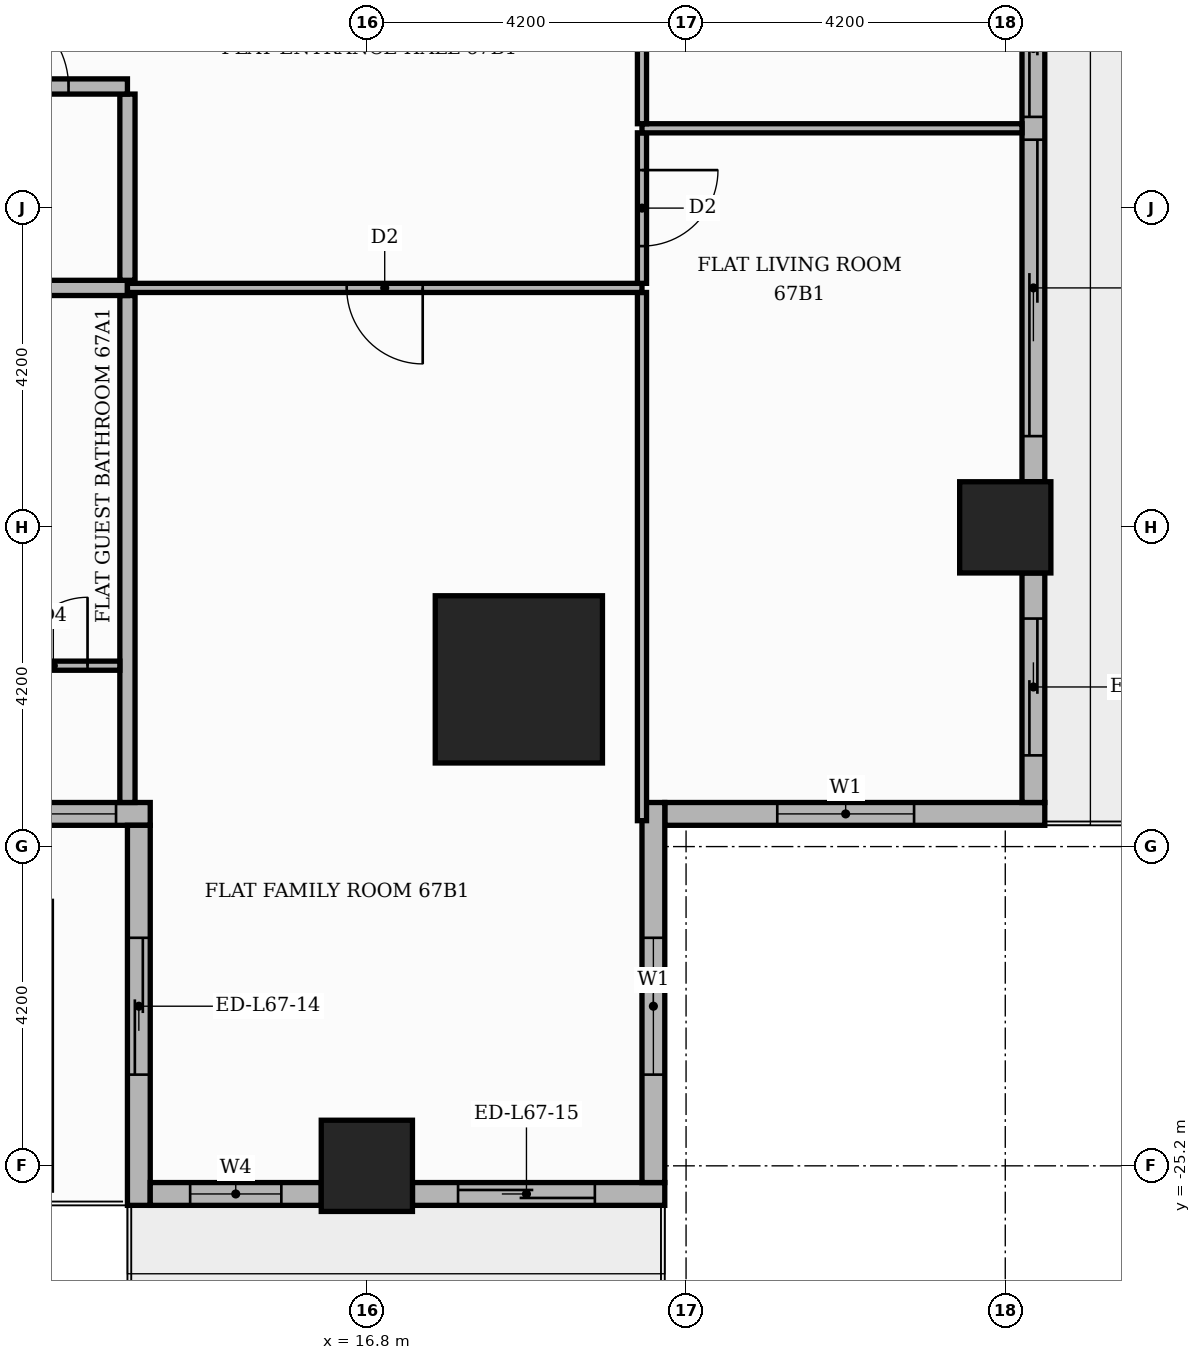
"""IFC4 building model, lengths in metres.
Left out: names, types, materials, properties, quantities, classifications, styles, units other than length and angle.
Written with IfcOpenShell. Run it as: python <this file> out.ifc"""

import sys

from ifc_helpers import new_model, si_unit, direction, frame, frame_2d, origin, origin_2d, place, context, subcontext, project, spatial, rectangle, extrude, element, fill, save


model = new_model("IFC4")
c1 = context("Model", 3, precision=1e-05, world=origin(), true_north=direction((0.0, 1.0)))
c2 = subcontext(c1, "Body", "Model", "MODEL_VIEW")
j1 = project(units=[si_unit("LENGTHUNIT", "METRE"), si_unit("PLANEANGLEUNIT", "RADIAN")], contexts=[c1])
p1 = place(None, origin())
s1 = spatial("IfcSite", under=j1, at=p1, CompositionType="ELEMENT")
p2 = place(p1, origin())
s2 = spatial("IfcBuilding", under=s1, at=p2, CompositionType="ELEMENT")
p3 = place(p2, frame((0.0, 0.0, 279.6)))
s3 = spatial("IfcBuildingStorey", under=s2, at=p3, CompositionType="ELEMENT", Elevation=279.6)
p4 = place(p3, frame((18.8, -18.8, 0.0), z_axis=(0.0, 0.0, 1.0), x_axis=(1.0, 0.0, 0.0)))
e1 = element("IfcColumn", 1, at=p4, inside=s3, PredefinedType="COLUMN", context=c2, shape_type="SweptSolid", body=[
    extrude(rectangle(XDim=2.2, YDim=2.2, at=origin_2d()), origin(), (0.0, 0.0, 1.0), 3.9),
])
for number, where, z_axis, x_axis in (
    (2, (25.2, -16.8, 0.0), (0.0, 0.0, 1.0), (1.0, 0.0, 0.0)),
    (3, (16.8, -25.2, 0.0), (0.0, 0.0, 1.0), (1.0, 0.0, 0.0)),
):
    element("IfcColumn", number, at=place(p3, frame(where, z_axis=z_axis, x_axis=x_axis)), inside=s3, PredefinedType="COLUMN", context=c2, shape_type="SweptSolid", body=[
        extrude(rectangle(XDim=1.2, YDim=1.2, at=origin_2d()), origin(), (0.0, 0.0, 1.0), 3.9),
    ])
p5 = place(p3, frame((20.72, -20.57, 0.0), z_axis=(0.0, 0.0, 1.0), x_axis=(1.0, 0.0, 0.0)))
e4 = element("IfcWall", 4, at=p5, inside=s3, PredefinedType="STANDARD", context=c2, shape_type="SweptSolid", body=[
    extrude(rectangle(XDim=5.0, YDim=0.3, at=frame_2d((2.5, 0.0))), origin(), (0.0, 0.0, 1.0), 3.48),
])
p6 = place(p5, frame((1.48, 0.0, 0.9)))
e5 = element("IfcOpeningElement", 5, at=p6, cuts=e4, PredefinedType="OPENING", context=c2, shape_type="SweptSolid", body=[
    extrude(rectangle(XDim=1.8, YDim=2.1, at=frame_2d((0.9, 1.05))), frame((0.0, 0.16, 0.0), z_axis=(0.0, -1.0, 0.0), x_axis=(1.0, 0.0, 0.0)), (0.0, 0.0, 1.0), 0.32),
])
p7 = place(p3, frame((25.57, -20.42, 0.0), z_axis=(0.0, 0.0, 1.0), x_axis=(0.0, 1.0, 0.0)))
e6 = element("IfcWall", 6, at=p7, inside=s3, PredefinedType="STANDARD", context=c2, shape_type="SweptSolid", body=[
    extrude(rectangle(XDim=3.02, YDim=0.3, at=frame_2d((1.51, 0.0))), origin(), (0.0, 0.0, 1.0), 3.48),
])
p8 = place(p7, frame((0.62, 0.0, 0.0)))
e7 = element("IfcOpeningElement", 7, at=p8, cuts=e6, PredefinedType="OPENING", context=c2, shape_type="SweptSolid", body=[
    extrude(rectangle(XDim=1.8, YDim=2.4, at=frame_2d((0.9, 1.2))), frame((0.0, 0.16, 0.0), z_axis=(0.0, -1.0, 0.0), x_axis=(1.0, 0.0, 0.0)), (0.0, 0.0, 1.0), 0.32),
])
p9 = place(p3, frame((25.57, -16.2, 0.0), z_axis=(0.0, 0.0, 1.0), x_axis=(0.0, 1.0, 0.0)))
e8 = element("IfcWall", 8, at=p9, inside=s3, PredefinedType="STANDARD", context=c2, shape_type="SweptSolid", body=[
    extrude(rectangle(XDim=7.2, YDim=0.3, at=frame_2d((3.6, 0.0))), origin(), (0.0, 0.0, 1.0), 3.48),
])
p10 = place(p9, frame((0.6, 0.0, 0.0)))
e9 = element("IfcOpeningElement", 9, at=p10, cuts=e8, PredefinedType="OPENING", context=c2, shape_type="SweptSolid", body=[
    extrude(rectangle(XDim=3.9, YDim=2.4, at=frame_2d((1.95, 1.2))), frame((0.0, 0.16, 0.0), z_axis=(0.0, -1.0, 0.0), x_axis=(1.0, 0.0, 0.0)), (0.0, 0.0, 1.0), 0.32),
])
p11 = place(p9, frame((4.8, 0.0, 0.0)))
e10 = element("IfcOpeningElement", 10, at=p11, cuts=e8, PredefinedType="OPENING", context=c2, shape_type="SweptSolid", body=[
    extrude(rectangle(XDim=1.8, YDim=2.4, at=frame_2d((0.9, 1.2))), frame((0.0, 0.16, 0.0), z_axis=(0.0, -1.0, 0.0), x_axis=(1.0, 0.0, 0.0)), (0.0, 0.0, 1.0), 0.32),
])
p12 = place(p3, frame((-13.65, -20.57, 0.0), z_axis=(0.0, 0.0, 1.0), x_axis=(1.0, 0.0, 0.0)))
e11 = element("IfcWall", 11, at=p12, inside=s3, PredefinedType="STANDARD", context=c2, shape_type="SweptSolid", body=[
    extrude(rectangle(XDim=27.6, YDim=0.3, at=frame_2d((13.8, 0.0))), origin(), (0.0, 0.0, 1.0), 3.48),
])
p13 = place(p12, frame((0.15, 0.0, 0.9)))
e12 = element("IfcOpeningElement", 12, at=p13, cuts=e11, PredefinedType="OPENING", context=c2, shape_type="SweptSolid", body=[
    extrude(rectangle(XDim=1.8, YDim=2.1, at=frame_2d((0.9, 1.05))), frame((0.0, 0.16, 0.0), z_axis=(0.0, -1.0, 0.0), x_axis=(1.0, 0.0, 0.0)), (0.0, 0.0, 1.0), 0.32),
])
p14 = place(p12, frame((2.25, 0.0, 0.9)))
e13 = element("IfcOpeningElement", 13, at=p14, cuts=e11, PredefinedType="OPENING", context=c2, shape_type="SweptSolid", body=[
    extrude(rectangle(XDim=6.0, YDim=2.1, at=frame_2d((3.0, 1.05))), frame((0.0, 0.16, 0.0), z_axis=(0.0, -1.0, 0.0), x_axis=(1.0, 0.0, 0.0)), (0.0, 0.0, 1.0), 0.32),
])
p15 = place(p12, frame((8.55, 0.0, 0.9)))
e14 = element("IfcOpeningElement", 14, at=p15, cuts=e11, PredefinedType="OPENING", context=c2, shape_type="SweptSolid", body=[
    extrude(rectangle(XDim=6.0, YDim=2.1, at=frame_2d((3.0, 1.05))), frame((0.0, 0.16, 0.0), z_axis=(0.0, -1.0, 0.0), x_axis=(1.0, 0.0, 0.0)), (0.0, 0.0, 1.0), 0.32),
])
p16 = place(p12, frame((14.85, 0.0, 0.9)))
e15 = element("IfcOpeningElement", 15, at=p16, cuts=e11, PredefinedType="OPENING", context=c2, shape_type="SweptSolid", body=[
    extrude(rectangle(XDim=6.0, YDim=2.1, at=frame_2d((3.0, 1.05))), frame((0.0, 0.16, 0.0), z_axis=(0.0, -1.0, 0.0), x_axis=(1.0, 0.0, 0.0)), (0.0, 0.0, 1.0), 0.32),
])
p17 = place(p12, frame((21.15, 0.0, 0.9)))
e16 = element("IfcOpeningElement", 16, at=p17, cuts=e11, PredefinedType="OPENING", context=c2, shape_type="SweptSolid", body=[
    extrude(rectangle(XDim=6.0, YDim=2.1, at=frame_2d((3.0, 1.05))), frame((0.0, 0.16, 0.0), z_axis=(0.0, -1.0, 0.0), x_axis=(1.0, 0.0, 0.0)), (0.0, 0.0, 1.0), 0.32),
])
p18 = place(p3, frame((13.8, -20.72, 0.0), z_axis=(0.0, 0.0, 1.0), x_axis=(0.0, -1.0, 0.0)))
e17 = element("IfcWall", 17, at=p18, inside=s3, PredefinedType="STANDARD", context=c2, shape_type="SweptSolid", body=[
    extrude(rectangle(XDim=5.0, YDim=0.3, at=frame_2d((2.5, 0.0))), origin(), (0.0, 0.0, 1.0), 3.48),
])
p19 = place(p18, frame((1.48, 0.0, 0.0)))
e18 = element("IfcOpeningElement", 18, at=p19, cuts=e17, PredefinedType="OPENING", context=c2, shape_type="SweptSolid", body=[
    extrude(rectangle(XDim=1.8, YDim=2.4, at=frame_2d((0.9, 1.2))), frame((0.0, 0.16, 0.0), z_axis=(0.0, -1.0, 0.0), x_axis=(1.0, 0.0, 0.0)), (0.0, 0.0, 1.0), 0.32),
])
p20 = place(p3, frame((13.95, -25.57, 0.0), z_axis=(0.0, 0.0, 1.0), x_axis=(1.0, 0.0, 0.0)))
e19 = element("IfcWall", 19, at=p20, inside=s3, PredefinedType="STANDARD", context=c2, shape_type="SweptSolid", body=[
    extrude(rectangle(XDim=2.25, YDim=0.3, at=frame_2d((1.125, 0.0))), origin(), (0.0, 0.0, 1.0), 3.48),
])
p21 = place(p20, frame((0.525, 0.0, 0.9)))
e20 = element("IfcOpeningElement", 20, at=p21, cuts=e19, PredefinedType="OPENING", context=c2, shape_type="SweptSolid", body=[
    extrude(rectangle(XDim=1.2, YDim=2.1, at=frame_2d((0.6, 1.05))), frame((0.0, 0.16, 0.0), z_axis=(0.0, -1.0, 0.0), x_axis=(1.0, 0.0, 0.0)), (0.0, 0.0, 1.0), 0.32),
])
p22 = place(p3, frame((17.4, -25.57, 0.0), z_axis=(0.0, 0.0, 1.0), x_axis=(1.0, 0.0, 0.0)))
e21 = element("IfcWall", 21, at=p22, inside=s3, PredefinedType="STANDARD", context=c2, shape_type="SweptSolid", body=[
    extrude(rectangle(XDim=3.32, YDim=0.3, at=frame_2d((1.66, 0.0))), origin(), (0.0, 0.0, 1.0), 3.48),
])
p23 = place(p22, frame((0.6, 0.0, 0.0)))
e22 = element("IfcOpeningElement", 22, at=p23, cuts=e21, PredefinedType="OPENING", context=c2, shape_type="SweptSolid", body=[
    extrude(rectangle(XDim=1.8, YDim=2.4, at=frame_2d((0.9, 1.2))), frame((0.0, 0.16, 0.0), z_axis=(0.0, -1.0, 0.0), x_axis=(1.0, 0.0, 0.0)), (0.0, 0.0, 1.0), 0.32),
])
p24 = place(p3, frame((20.57, -25.42, 0.0), z_axis=(0.0, 0.0, 1.0), x_axis=(0.0, 1.0, 0.0)))
e23 = element("IfcWall", 23, at=p24, inside=s3, PredefinedType="STANDARD", context=c2, shape_type="SweptSolid", body=[
    extrude(rectangle(XDim=5.0, YDim=0.3, at=frame_2d((2.5, 0.0))), origin(), (0.0, 0.0, 1.0), 3.48),
])
p25 = place(p24, frame((1.42, 0.0, 0.9)))
e24 = element("IfcOpeningElement", 24, at=p25, cuts=e23, PredefinedType="OPENING", context=c2, shape_type="SweptSolid", body=[
    extrude(rectangle(XDim=1.8, YDim=2.1, at=frame_2d((0.9, 1.05))), frame((0.0, 0.16, 0.0), z_axis=(0.0, -1.0, 0.0), x_axis=(1.0, 0.0, 0.0)), (0.0, 0.0, 1.0), 0.32),
])
p26 = place(p3, frame((13.65, -20.42, 0.0), z_axis=(0.0, 0.0, 1.0), x_axis=(0.0, 1.0, 0.0)))
e25 = element("IfcWall", 25, at=p26, inside=s3, PredefinedType="PARTITIONING", context=c2, shape_type="SweptSolid", body=[
    extrude(rectangle(XDim=6.67, YDim=0.2, at=frame_2d((3.335, 0.0))), origin(), (0.0, 0.0, 1.0), 3.48),
])
p27 = place(p3, frame((20.42, -20.659, 0.0), z_axis=(0.0, 0.0, 1.0), x_axis=(0.0, 1.0, 0.0)))
e26 = element("IfcWall", 26, at=p27, inside=s3, PredefinedType="PARTITIONING", context=c2, shape_type="SweptSolid", body=[
    extrude(rectangle(XDim=6.949, YDim=0.12, at=frame_2d((3.475, 0.0))), origin(), (0.0, 0.0, 1.0), 3.48),
])
p28 = place(p3, frame((-7.35, -18.62, 0.0), z_axis=(0.0, 0.0, 1.0), x_axis=(1.0, 0.0, 0.0)))
e27 = element("IfcWall", 27, at=p28, inside=s3, PredefinedType="PARTITIONING", context=c2, shape_type="SweptSolid", body=[
    extrude(rectangle(XDim=20.9, YDim=0.12, at=frame_2d((10.45, 0.0))), origin(), (0.0, 0.0, 1.0), 3.48),
])
p29 = place(p28, frame((2.7, 0.0, 0.0)))
e28 = element("IfcOpeningElement", 28, at=p29, cuts=e27, PredefinedType="OPENING", context=c2, shape_type="SweptSolid", body=[
    extrude(rectangle(XDim=0.9, YDim=2.1, at=frame_2d((0.45, 1.05))), frame((0.0, 0.07, 0.0), z_axis=(0.0, -1.0, 0.0), x_axis=(1.0, 0.0, 0.0)), (0.0, 0.0, 1.0), 0.14),
])
p30 = place(p28, frame((7.95, 0.0, 0.0)))
e29 = element("IfcOpeningElement", 29, at=p30, cuts=e27, PredefinedType="OPENING", context=c2, shape_type="SweptSolid", body=[
    extrude(rectangle(XDim=0.9, YDim=2.1, at=frame_2d((0.45, 1.05))), frame((0.0, 0.07, 0.0), z_axis=(0.0, -1.0, 0.0), x_axis=(1.0, 0.0, 0.0)), (0.0, 0.0, 1.0), 0.14),
])
p31 = place(p28, frame((13.35, 0.0, 0.0)))
e30 = element("IfcOpeningElement", 30, at=p31, cuts=e27, PredefinedType="OPENING", context=c2, shape_type="SweptSolid", body=[
    extrude(rectangle(XDim=0.9, YDim=2.1, at=frame_2d((0.45, 1.05))), frame((0.0, 0.07, 0.0), z_axis=(0.0, -1.0, 0.0), x_axis=(1.0, 0.0, 0.0)), (0.0, 0.0, 1.0), 0.14),
])
p32 = place(p28, frame((17.625, 0.0, 0.0)))
e31 = element("IfcOpeningElement", 31, at=p32, cuts=e27, PredefinedType="OPENING", context=c2, shape_type="SweptSolid", body=[
    extrude(rectangle(XDim=0.9, YDim=2.1, at=frame_2d((0.45, 1.05))), frame((0.0, 0.07, 0.0), z_axis=(0.0, -1.0, 0.0), x_axis=(1.0, 0.0, 0.0)), (0.0, 0.0, 1.0), 0.14),
])
p33 = place(p28, frame((19.575, 0.0, 0.0)))
e32 = element("IfcOpeningElement", 32, at=p33, cuts=e27, PredefinedType="OPENING", context=c2, shape_type="SweptSolid", body=[
    extrude(rectangle(XDim=0.9, YDim=2.1, at=frame_2d((0.45, 1.05))), frame((0.0, 0.07, 0.0), z_axis=(0.0, -1.0, 0.0), x_axis=(1.0, 0.0, 0.0)), (0.0, 0.0, 1.0), 0.14),
])
p34 = place(p3, frame((-25.42, -13.65, 0.0), z_axis=(0.0, 0.0, 1.0), x_axis=(1.0, 0.0, 0.0)))
e33 = element("IfcWall", 33, at=p34, inside=s3, PredefinedType="PARTITIONING", context=c2, shape_type="SweptSolid", body=[
    extrude(rectangle(XDim=39.07, YDim=0.2, at=frame_2d((19.535, 0.0))), origin(), (0.0, 0.0, 1.0), 3.48),
])
p35 = place(p34, frame((14.37, 0.0, 0.0)))
e34 = element("IfcOpeningElement", 34, at=p35, cuts=e33, PredefinedType="OPENING", context=c2, shape_type="SweptSolid", body=[
    extrude(rectangle(XDim=1.1, YDim=2.4, at=frame_2d((0.55, 1.2))), frame((0.0, 0.11, 0.0), z_axis=(0.0, -1.0, 0.0), x_axis=(1.0, 0.0, 0.0)), (0.0, 0.0, 1.0), 0.22),
])
p36 = place(p3, frame((13.65, -13.65, 0.0), z_axis=(0.0, 0.0, 1.0), x_axis=(1.0, 0.0, 0.0)))
e35 = element("IfcWall", 35, at=p36, inside=s3, PredefinedType="PARTITIONING", context=c2, shape_type="SweptSolid", body=[
    extrude(rectangle(XDim=6.77, YDim=0.12, at=frame_2d((3.385, 0.0))), origin(), (0.0, 0.0, 1.0), 3.48),
])
p37 = place(p36, frame((2.885, 0.0, 0.0)))
e36 = element("IfcOpeningElement", 36, at=p37, cuts=e35, PredefinedType="OPENING", context=c2, shape_type="SweptSolid", body=[
    extrude(rectangle(XDim=1.0, YDim=2.1, at=frame_2d((0.5, 1.05))), frame((0.0, 0.07, 0.0), z_axis=(0.0, -1.0, 0.0), x_axis=(1.0, 0.0, 0.0)), (0.0, 0.0, 1.0), 0.14),
])
p38 = place(p3, frame((20.42, -13.59, 0.0), z_axis=(0.0, 0.0, 1.0), x_axis=(0.0, 1.0, 0.0)))
e37 = element("IfcWall", 37, at=p38, inside=s3, PredefinedType="PARTITIONING", context=c2, shape_type="SweptSolid", body=[
    extrude(rectangle(XDim=1.98, YDim=0.12, at=frame_2d((0.99, 0.0))), origin(), (0.0, 0.0, 1.0), 3.48),
])
p39 = place(p38, frame((0.49, 0.0, 0.0)))
e38 = element("IfcOpeningElement", 38, at=p39, cuts=e37, PredefinedType="OPENING", context=c2, shape_type="SweptSolid", body=[
    extrude(rectangle(XDim=1.0, YDim=2.1, at=frame_2d((0.5, 1.05))), frame((0.0, 0.07, 0.0), z_axis=(0.0, -1.0, 0.0), x_axis=(1.0, 0.0, 0.0)), (0.0, 0.0, 1.0), 0.14),
])
p40 = place(p3, frame((13.65, -13.55, 0.0), z_axis=(0.0, 0.0, 1.0), x_axis=(0.0, 1.0, 0.0)))
e39 = element("IfcWall", 39, at=p40, inside=s3, PredefinedType="PARTITIONING", context=c2, shape_type="SweptSolid", body=[
    extrude(rectangle(XDim=2.45, YDim=0.2, at=frame_2d((1.225, 0.0))), origin(), (0.0, 0.0, 1.0), 3.48),
])
p41 = place(p3, frame((20.42, -11.55, 0.0), z_axis=(0.0, 0.0, 1.0), x_axis=(1.0, 0.0, 0.0)))
e40 = element("IfcWall", 40, at=p41, inside=s3, PredefinedType="PARTITIONING", context=c2, shape_type="SweptSolid", body=[
    extrude(rectangle(XDim=5.0, YDim=0.12, at=frame_2d((2.5, 0.0))), origin(), (0.0, 0.0, 1.0), 3.48),
])
p42 = place(p3, frame((20.42, -11.49, 0.0), z_axis=(0.0, 0.0, 1.0), x_axis=(0.0, 1.0, 0.0)))
e41 = element("IfcWall", 41, at=p42, inside=s3, PredefinedType="PARTITIONING", context=c2, shape_type="SweptSolid", body=[
    extrude(rectangle(XDim=8.28, YDim=0.12, at=frame_2d((4.14, 0.0))), origin(), (0.0, 0.0, 1.0), 3.48),
])
p43 = place(p42, frame((3.69, 0.0, 0.0)))
e42 = element("IfcOpeningElement", 42, at=p43, cuts=e41, PredefinedType="OPENING", context=c2, shape_type="SweptSolid", body=[
    extrude(rectangle(XDim=0.9, YDim=2.1, at=frame_2d((0.45, 1.05))), frame((0.0, 0.07, 0.0), z_axis=(0.0, -1.0, 0.0), x_axis=(1.0, 0.0, 0.0)), (0.0, 0.0, 1.0), 0.14),
])
p44 = place(p3, frame((11.0, -11.0, 0.0), z_axis=(0.0, 0.0, 1.0), x_axis=(1.0, 0.0, 0.0)))
e43 = element("IfcWall", 43, at=p44, inside=s3, PredefinedType="PARTITIONING", context=c2, shape_type="SweptSolid", body=[
    extrude(rectangle(XDim=2.65, YDim=0.2, at=frame_2d((1.325, 0.0))), origin(), (0.0, 0.0, 1.0), 3.48),
])
p45 = place(p44, frame((0.775, 0.0, 0.0)))
e44 = element("IfcOpeningElement", 44, at=p45, cuts=e43, PredefinedType="OPENING", context=c2, shape_type="SweptSolid", body=[
    extrude(rectangle(XDim=1.1, YDim=2.4, at=frame_2d((0.55, 1.2))), frame((0.0, 0.11, 0.0), z_axis=(0.0, -1.0, 0.0), x_axis=(1.0, 0.0, 0.0)), (0.0, 0.0, 1.0), 0.22),
])
p46 = place(p6, origin())
e45 = element("IfcWindow", 45, at=p46, inside=s3, PartitioningType="SINGLE_PANEL", PredefinedType="WINDOW", context=c2, shape_type="SweptSolid", body=[
    extrude(rectangle(XDim=1.8, YDim=2.1, at=frame_2d((0.9, 1.05))), frame((0.0, 0.03, 0.0), z_axis=(0.0, -1.0, 0.0), x_axis=(1.0, 0.0, 0.0)), (0.0, 0.0, 1.0), 0.06),
])
fill(e5, e45)
p47 = place(p8, origin())
e46 = element("IfcDoor", 46, at=p47, inside=s3, OperationType="SLIDING_TO_RIGHT", PredefinedType="DOOR", context=c2, shape_type="SweptSolid", body=[
    extrude(rectangle(XDim=1.8, YDim=2.4, at=frame_2d((0.9, 1.2))), frame((0.0, 0.025, 0.0), z_axis=(0.0, -1.0, 0.0), x_axis=(1.0, 0.0, 0.0)), (0.0, 0.0, 1.0), 0.05),
])
fill(e7, e46)
p48 = place(p10, origin())
e47 = element("IfcDoor", 47, at=p48, inside=s3, OperationType="SLIDING_TO_LEFT", PredefinedType="DOOR", context=c2, shape_type="SweptSolid", body=[
    extrude(rectangle(XDim=3.9, YDim=2.4, at=frame_2d((1.95, 1.2))), frame((0.0, 0.025, 0.0), z_axis=(0.0, -1.0, 0.0), x_axis=(1.0, 0.0, 0.0)), (0.0, 0.0, 1.0), 0.05),
])
fill(e9, e47)
p49 = place(p11, origin())
e48 = element("IfcDoor", 48, at=p49, inside=s3, OperationType="SLIDING_TO_RIGHT", PredefinedType="DOOR", context=c2, shape_type="SweptSolid", body=[
    extrude(rectangle(XDim=1.8, YDim=2.4, at=frame_2d((0.9, 1.2))), frame((0.0, 0.025, 0.0), z_axis=(0.0, -1.0, 0.0), x_axis=(1.0, 0.0, 0.0)), (0.0, 0.0, 1.0), 0.05),
])
fill(e10, e48)
p50 = place(p17, origin())
e49 = element("IfcWindow", 49, at=p50, inside=s3, PartitioningType="SINGLE_PANEL", PredefinedType="WINDOW", context=c2, shape_type="SweptSolid", body=[
    extrude(rectangle(XDim=6.0, YDim=2.1, at=frame_2d((3.0, 1.05))), frame((0.0, 0.03, 0.0), z_axis=(0.0, -1.0, 0.0), x_axis=(1.0, 0.0, 0.0)), (0.0, 0.0, 1.0), 0.06),
])
fill(e16, e49)
p51 = place(p19, origin())
e50 = element("IfcDoor", 50, at=p51, inside=s3, OperationType="SLIDING_TO_RIGHT", PredefinedType="DOOR", context=c2, shape_type="SweptSolid", body=[
    extrude(rectangle(XDim=1.8, YDim=2.4, at=frame_2d((0.9, 1.2))), frame((0.0, 0.025, 0.0), z_axis=(0.0, -1.0, 0.0), x_axis=(1.0, 0.0, 0.0)), (0.0, 0.0, 1.0), 0.05),
])
fill(e18, e50)
p52 = place(p21, origin())
e51 = element("IfcWindow", 51, at=p52, inside=s3, PartitioningType="SINGLE_PANEL", PredefinedType="WINDOW", context=c2, shape_type="SweptSolid", body=[
    extrude(rectangle(XDim=1.2, YDim=2.1, at=frame_2d((0.6, 1.05))), frame((0.0, 0.03, 0.0), z_axis=(0.0, -1.0, 0.0), x_axis=(1.0, 0.0, 0.0)), (0.0, 0.0, 1.0), 0.06),
])
fill(e20, e51)
p53 = place(p23, origin())
e52 = element("IfcDoor", 52, at=p53, inside=s3, OperationType="SLIDING_TO_LEFT", PredefinedType="DOOR", context=c2, shape_type="SweptSolid", body=[
    extrude(rectangle(XDim=1.8, YDim=2.4, at=frame_2d((0.9, 1.2))), frame((0.0, 0.025, 0.0), z_axis=(0.0, -1.0, 0.0), x_axis=(1.0, 0.0, 0.0)), (0.0, 0.0, 1.0), 0.05),
])
fill(e22, e52)
p54 = place(p25, origin())
e53 = element("IfcWindow", 53, at=p54, inside=s3, PartitioningType="SINGLE_PANEL", PredefinedType="WINDOW", context=c2, shape_type="SweptSolid", body=[
    extrude(rectangle(XDim=1.8, YDim=2.1, at=frame_2d((0.9, 1.05))), frame((0.0, 0.03, 0.0), z_axis=(0.0, -1.0, 0.0), x_axis=(1.0, 0.0, 0.0)), (0.0, 0.0, 1.0), 0.06),
])
fill(e24, e53)
p55 = place(p33, origin())
e54 = element("IfcDoor", 54, at=p55, inside=s3, OperationType="SINGLE_SWING_RIGHT", PredefinedType="DOOR", context=c2, shape_type="SweptSolid", body=[
    extrude(rectangle(XDim=0.9, YDim=2.1, at=frame_2d((0.45, 1.05))), frame((0.0, 0.025, 0.0), z_axis=(0.0, -1.0, 0.0), x_axis=(1.0, 0.0, 0.0)), (0.0, 0.0, 1.0), 0.05),
])
fill(e32, e54)
p56 = place(p45, origin())
e55 = element("IfcDoor", 55, at=p56, inside=s3, OperationType="SINGLE_SWING_LEFT", PredefinedType="DOOR", context=c2, shape_type="SweptSolid", body=[
    extrude(rectangle(XDim=1.1, YDim=2.4, at=frame_2d((0.55, 1.2))), frame((0.0, 0.025, 0.0), z_axis=(0.0, -1.0, 0.0), x_axis=(1.0, 0.0, 0.0)), (0.0, 0.0, 1.0), 0.05),
])
fill(e44, e55)
p57 = place(p37, frame((1.0, 0.0, 0.0), z_axis=(0.0, 0.0, 1.0), x_axis=(-1.0, 0.0, 0.0)))
e56 = element("IfcDoor", 56, at=p57, inside=s3, OperationType="SINGLE_SWING_RIGHT", PredefinedType="DOOR", context=c2, shape_type="SweptSolid", body=[
    extrude(rectangle(XDim=1.0, YDim=2.1, at=frame_2d((0.5, 1.05))), frame((0.0, 0.025, 0.0), z_axis=(0.0, -1.0, 0.0), x_axis=(1.0, 0.0, 0.0)), (0.0, 0.0, 1.0), 0.05),
])
fill(e36, e56)
p58 = place(p39, frame((1.0, 0.0, 0.0), z_axis=(0.0, 0.0, 1.0), x_axis=(-1.0, 0.0, 0.0)))
e57 = element("IfcDoor", 57, at=p58, inside=s3, OperationType="SINGLE_SWING_RIGHT", PredefinedType="DOOR", context=c2, shape_type="SweptSolid", body=[
    extrude(rectangle(XDim=1.0, YDim=2.1, at=frame_2d((0.5, 1.05))), frame((0.0, 0.025, 0.0), z_axis=(0.0, -1.0, 0.0), x_axis=(1.0, 0.0, 0.0)), (0.0, 0.0, 1.0), 0.05),
])
fill(e38, e57)
save(model, sys.argv[1])
